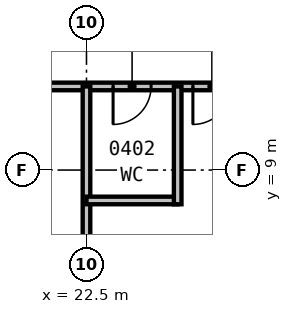
"""IFC4 building model, lengths in metres.
Left out: names, types, materials, properties, quantities, classifications, styles, units other than length and angle.
Written with IfcOpenShell. Run it as: python <this file> out.ifc"""

import sys

from ifc_helpers import new_model, si_unit, direction, frame, frame_2d, origin, place, context, subcontext, project, spatial, rectangle, extrude, element, fill, save


model = new_model("IFC4")
c1 = context("Model", 3, precision=1e-05, world=origin(), true_north=direction((0.0, 1.0)))
c2 = subcontext(c1, "Body", "Model", "MODEL_VIEW")
j1 = project(units=[si_unit("LENGTHUNIT", "METRE"), si_unit("PLANEANGLEUNIT", "RADIAN")], contexts=[c1])
p1 = place(None, origin())
s1 = spatial("IfcSite", under=j1, at=p1, CompositionType="ELEMENT")
p2 = place(p1, origin())
s2 = spatial("IfcBuilding", under=s1, at=p2, CompositionType="ELEMENT")
p3 = place(p2, frame((0.0, 0.0, 24.0)))
s3 = spatial("IfcBuildingStorey", under=s2, at=p3, CompositionType="ELEMENT", Elevation=24.0)
p4 = place(p3, frame((11.2, 11.2, 0.0), z_axis=(0.0, 0.0, 1.0), x_axis=(1.0, 0.0, 0.0)))
e1 = element("IfcWall", 1, at=p4, inside=s3, PredefinedType="PARTITIONING", context=c2, shape_type="SweptSolid", body=[
    extrude(rectangle(XDim=27.1, YDim=0.2, at=frame_2d((13.55, 0.0))), origin(), (0.0, 0.0, 1.0), 5.45),
])
p5 = place(p4, frame((4.55, 0.0, 0.0), z_axis=(0.0, 0.0, 1.0), x_axis=(-1.0, 0.0, 0.0)))
e2 = element("IfcOpeningElement", 2, at=p5, cuts=e1, PredefinedType="OPENING", context=c2, shape_type="SweptSolid", body=[
    extrude(rectangle(XDim=1.8, YDim=2.4, at=frame_2d((0.9, 1.2))), frame((0.0, 0.11, 0.0), z_axis=(0.0, -1.0, 0.0), x_axis=(1.0, 0.0, 0.0)), (0.0, 0.0, 1.0), 0.22),
])
p6 = place(p4, frame((13.0, 0.0, 0.0), z_axis=(0.0, 0.0, 1.0), x_axis=(-1.0, 0.0, 0.0)))
e3 = element("IfcOpeningElement", 3, at=p6, cuts=e1, PredefinedType="OPENING", context=c2, shape_type="SweptSolid", body=[
    extrude(rectangle(XDim=1.0, YDim=2.1, at=frame_2d((0.5, 1.05))), frame((0.0, 0.11, 0.0), z_axis=(0.0, -1.0, 0.0), x_axis=(1.0, 0.0, 0.0)), (0.0, 0.0, 1.0), 0.22),
])
p7 = place(p4, frame((15.1, 0.0, 0.0), z_axis=(0.0, 0.0, 1.0), x_axis=(-1.0, 0.0, 0.0)))
e4 = element("IfcOpeningElement", 4, at=p7, cuts=e1, PredefinedType="OPENING", context=c2, shape_type="SweptSolid", body=[
    extrude(rectangle(XDim=1.0, YDim=2.1, at=frame_2d((0.5, 1.05))), frame((0.0, 0.11, 0.0), z_axis=(0.0, -1.0, 0.0), x_axis=(1.0, 0.0, 0.0)), (0.0, 0.0, 1.0), 0.22),
])
p8 = place(p4, frame((17.45, 0.0, 0.0), z_axis=(0.0, 0.0, 1.0), x_axis=(-1.0, 0.0, 0.0)))
e5 = element("IfcOpeningElement", 5, at=p8, cuts=e1, PredefinedType="OPENING", context=c2, shape_type="SweptSolid", body=[
    extrude(rectangle(XDim=1.2, YDim=2.1, at=frame_2d((0.6, 1.05))), frame((0.0, 0.11, 0.0), z_axis=(0.0, -1.0, 0.0), x_axis=(1.0, 0.0, 0.0)), (0.0, 0.0, 1.0), 0.22),
])
p9 = place(p4, frame((1.75, 0.0, 0.0), z_axis=(0.0, 0.0, 1.0), x_axis=(-1.0, 0.0, 0.0)))
e6 = element("IfcOpeningElement", 6, at=p9, cuts=e1, PredefinedType="OPENING", context=c2, shape_type="SweptSolid", body=[
    extrude(rectangle(XDim=1.2, YDim=2.1, at=frame_2d((0.6, 1.05))), frame((0.0, 0.11, 0.0), z_axis=(0.0, -1.0, 0.0), x_axis=(1.0, 0.0, 0.0)), (0.0, 0.0, 1.0), 0.22),
])
p10 = place(p4, frame((26.55, 0.0, 0.0), z_axis=(0.0, 0.0, 1.0), x_axis=(-1.0, 0.0, 0.0)))
e7 = element("IfcOpeningElement", 7, at=p10, cuts=e1, PredefinedType="OPENING", context=c2, shape_type="SweptSolid", body=[
    extrude(rectangle(XDim=1.2, YDim=2.1, at=frame_2d((0.6, 1.05))), frame((0.0, 0.11, 0.0), z_axis=(0.0, -1.0, 0.0), x_axis=(1.0, 0.0, 0.0)), (0.0, 0.0, 1.0), 0.22),
])
p11 = place(p3, frame((22.5, 11.2, 0.0), z_axis=(0.0, 0.0, 1.0), x_axis=(0.0, -1.0, 0.0)))
e8 = element("IfcWall", 8, at=p11, inside=s3, PredefinedType="PARTITIONING", context=c2, shape_type="SweptSolid", body=[
    extrude(rectangle(XDim=11.05, YDim=0.2, at=frame_2d((5.525, 0.0))), origin(), (0.0, 0.0, 1.0), 4.45),
])
p12 = place(p3, frame((24.9, 11.2, 0.0), z_axis=(0.0, 0.0, 1.0), x_axis=(0.0, -1.0, 0.0)))
e9 = element("IfcWall", 9, at=p12, inside=s3, PredefinedType="PARTITIONING", context=c2, shape_type="SweptSolid", body=[
    extrude(rectangle(XDim=3.1, YDim=0.2, at=frame_2d((1.55, 0.0))), origin(), (0.0, 0.0, 1.0), 5.45),
])
p13 = place(p3, frame((22.5, 8.2, 0.0), z_axis=(0.0, 0.0, 1.0), x_axis=(1.0, 0.0, 0.0)))
e10 = element("IfcWall", 10, at=p13, inside=s3, PredefinedType="PARTITIONING", context=c2, shape_type="SweptSolid", body=[
    extrude(rectangle(XDim=2.4, YDim=0.2, at=frame_2d((1.2, 0.0))), origin(), (0.0, 0.0, 1.0), 5.45),
])
p14 = place(p6, origin())
e11 = element("IfcDoor", 11, at=p14, inside=s3, OperationType="SINGLE_SWING_RIGHT", PredefinedType="DOOR", context=c2, shape_type="SweptSolid", body=[
    extrude(rectangle(XDim=1.0, YDim=2.1, at=frame_2d((0.5, 1.05))), frame((0.0, 0.025, 0.0), z_axis=(0.0, -1.0, 0.0), x_axis=(1.0, 0.0, 0.0)), (0.0, 0.0, 1.0), 0.05),
])
fill(e3, e11)
p15 = place(p7, origin())
e12 = element("IfcDoor", 12, at=p15, inside=s3, OperationType="SINGLE_SWING_RIGHT", PredefinedType="DOOR", context=c2, shape_type="SweptSolid", body=[
    extrude(rectangle(XDim=1.0, YDim=2.1, at=frame_2d((0.5, 1.05))), frame((0.0, 0.025, 0.0), z_axis=(0.0, -1.0, 0.0), x_axis=(1.0, 0.0, 0.0)), (0.0, 0.0, 1.0), 0.05),
])
fill(e4, e12)
save(model, sys.argv[1])
